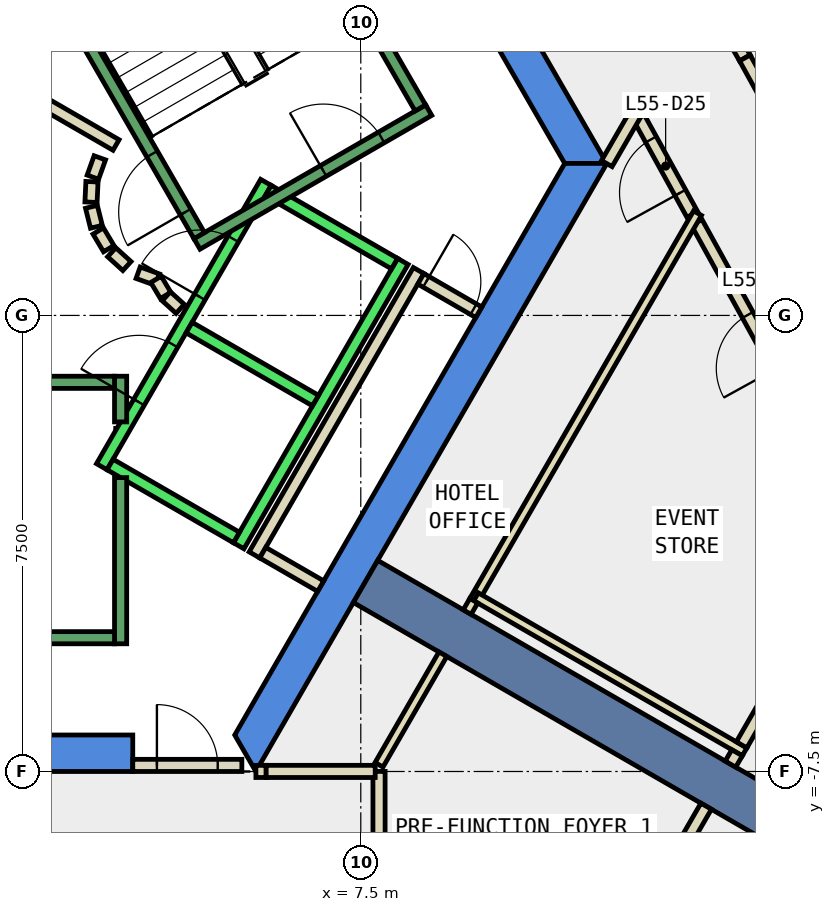
"""IFC4 building model, lengths in metres.
Left out: names, types, materials, properties, quantities, classifications, styles, units other than length and angle.
Written with IfcOpenShell. Run it as: python <this file> out.ifc"""

import sys

from ifc_helpers import new_model, si_unit, direction, frame, frame_2d, origin, place, context, subcontext, project, spatial, polyline, rectangle, outline, extrude, element, fill, save


model = new_model("IFC4")
c1 = context("Model", 3, precision=1e-05, world=origin(), true_north=direction((0.0, 1.0)))
c2 = subcontext(c1, "Body", "Model", "MODEL_VIEW")
j1 = project(units=[si_unit("LENGTHUNIT", "METRE"), si_unit("PLANEANGLEUNIT", "RADIAN")], contexts=[c1])
p1 = place(None, origin())
s1 = spatial("IfcSite", under=j1, at=p1, CompositionType="ELEMENT")
p2 = place(p1, origin())
s2 = spatial("IfcBuilding", under=s1, at=p2, CompositionType="ELEMENT")
p3 = place(p2, frame((0.0, 0.0, 245.0)))
s3 = spatial("IfcBuildingStorey", under=s2, at=p3, CompositionType="ELEMENT", Elevation=245.0)
p4 = place(p3, frame((0.0, 0.0, -0.34)))
e1 = element("IfcWall", 1, at=p4, inside=s3, PredefinedType="SHEAR", context=c2, shape_type="SweptSolid", body=[
    extrude(outline(polyline([(6.786, 10.747), (6.266, 10.447), (10.854, 2.5), (11.547, 2.5), (6.786, 10.747)])), origin(), (0.0, 0.0, 1.0), 3.6),
])
p5 = place(p3, frame((0.0, 0.0, -0.34)))
e2 = element("IfcWall", 2, at=p5, inside=s3, PredefinedType="SHEAR", context=c2, shape_type="SweptSolid", body=[
    extrude(outline(polyline([(3.75, -7.5), (3.75, -6.9), (-5.427, -6.9), (-5.774, -7.5), (3.75, -7.5)])), origin(), (0.0, 0.0, 1.0), 3.6),
])
p6 = place(p3, frame((0.0, 0.0, -0.34)))
e3 = element("IfcWall", 3, at=p6, inside=s3, PredefinedType="SHEAR", context=c2, shape_type="SweptSolid", body=[
    extrude(outline(polyline([(5.774, -7.5), (11.547, 2.5), (10.854, 2.5), (5.427, -6.9), (5.774, -7.5)])), origin(), (0.0, 0.0, 1.0), 3.6),
])
p7 = place(p3, frame((7.578, -4.375, -0.34), z_axis=(0.0, 0.0, 1.0), x_axis=(0.866024315419, -0.5000018851, 0.0)))
e4 = element("IfcWall", 4, at=p7, inside=s3, PredefinedType="SHEAR", context=c2, shape_type="SweptSolid", body=[
    extrude(rectangle(XDim=9.0, YDim=0.8, at=frame_2d((4.5, 0.0))), origin(), (0.0, 0.0, 1.0), 3.6),
])
p8 = place(p3, frame((12.952, 1.661, 0.0), z_axis=(0.0, 0.0, 1.0), x_axis=(-0.482707835392, 0.875781448566, 0.0)))
e5 = element("IfcWall", 5, at=p8, inside=s3, PredefinedType="PARTITIONING", context=c2, shape_type="SweptSolid", body=[
    extrude(rectangle(XDim=1.817, YDim=0.2, at=frame_2d((0.908, 0.0))), origin(), (0.0, 0.0, 1.0), 3.26),
])
p9 = place(p8, frame((0.408, 0.0, 0.0)))
e6 = element("IfcOpeningElement", 6, at=p9, cuts=e5, PredefinedType="OPENING", context=c2, shape_type="SweptSolid", body=[
    extrude(rectangle(XDim=1.0, YDim=2.1, at=frame_2d((0.5, 1.05))), frame((0.0, 0.11, 0.0), z_axis=(0.0, -1.0, 0.0), x_axis=(1.0, 0.0, 0.0)), (0.0, 0.0, 1.0), 0.22),
])
p10 = place(p3, frame((12.079, 3.419, 0.0), z_axis=(0.0, 0.0, 1.0), x_axis=(-0.500674759037, -0.865635480825, 0.0)))
e7 = element("IfcWall", 7, at=p10, inside=s3, PredefinedType="PARTITIONING", context=c2, shape_type="SweptSolid", body=[
    extrude(rectangle(XDim=1.065, YDim=0.2, at=frame_2d((0.532, 0.0))), origin(), (0.0, 0.0, 1.0), 3.26),
])
p11 = place(p3, frame((15.186, -2.391, 0.0), z_axis=(0.0, 0.0, 1.0), x_axis=(-0.482858240592, 0.875698532311, 0.0)))
e8 = element("IfcWall", 8, at=p11, inside=s3, PredefinedType="PARTITIONING", context=c2, shape_type="SweptSolid", body=[
    extrude(rectangle(XDim=4.478, YDim=0.2, at=frame_2d((2.239, 0.0))), origin(), (0.0, 0.0, 1.0), 3.26),
])
p12 = place(p11, frame((1.739, 0.0, 0.0)))
e9 = element("IfcOpeningElement", 9, at=p12, cuts=e8, PredefinedType="OPENING", context=c2, shape_type="SweptSolid", body=[
    extrude(rectangle(XDim=1.0, YDim=2.1, at=frame_2d((0.5, 1.05))), frame((0.0, 0.11, 0.0), z_axis=(0.0, -1.0, 0.0), x_axis=(1.0, 0.0, 0.0)), (0.0, 0.0, 1.0), 0.22),
])
p13 = place(p3, frame((12.234, 6.977, 0.0), z_axis=(0.0, 0.0, 1.0), x_axis=(0.499820325382, -0.866129114125, 0.0)))
e10 = element("IfcWall", 10, at=p13, inside=s3, PredefinedType="PARTITIONING", context=c2, shape_type="SweptSolid", body=[
    extrude(rectangle(XDim=3.167, YDim=0.2, at=frame_2d((1.583, 0.0))), origin(), (0.0, 0.0, 1.0), 3.26),
])
p14 = place(p13, frame((1.084, 0.0, 0.0)))
e11 = element("IfcOpeningElement", 11, at=p14, cuts=e10, PredefinedType="OPENING", context=c2, shape_type="SweptSolid", body=[
    extrude(rectangle(XDim=1.0, YDim=2.1, at=frame_2d((0.5, 1.05))), frame((0.0, 0.11, 0.0), z_axis=(0.0, -1.0, 0.0), x_axis=(1.0, 0.0, 0.0)), (0.0, 0.0, 1.0), 0.22),
])
p15 = place(p3, frame((13.817, 4.234, 0.0), z_axis=(0.0, 0.0, 1.0), x_axis=(0.482871474341, -0.875691235121, 0.0)))
e12 = element("IfcWall", 12, at=p15, inside=s3, PredefinedType="PARTITIONING", context=c2, shape_type="SweptSolid", body=[
    extrude(rectangle(XDim=3.167, YDim=0.2, at=frame_2d((1.583, 0.0))), origin(), (0.0, 0.0, 1.0), 3.26),
])
p16 = place(p3, frame((5.751, -3.938, 0.0), z_axis=(0.0, 0.0, 1.0), x_axis=(0.500034260056, 0.866005622828, 0.0)))
e13 = element("IfcWall", 13, at=p16, inside=s3, PredefinedType="PARTITIONING", context=c2, shape_type="SweptSolid", body=[
    extrude(rectangle(XDim=5.399, YDim=0.2, at=frame_2d((2.7, 0.0))), origin(), (0.0, 0.0, 1.0), 3.26),
])
p17 = place(p3, frame((8.488, 0.602, 0.0), z_axis=(0.0, 0.0, 1.0), x_axis=(0.866063652425, -0.499933745558, 0.0)))
e14 = element("IfcWall", 14, at=p17, inside=s3, PredefinedType="PARTITIONING", context=c2, shape_type="SweptSolid", body=[
    extrude(rectangle(XDim=1.1, YDim=0.2, at=frame_2d((0.55, 0.0))), origin(), (0.0, 0.0, 1.0), 3.26),
])
p18 = place(p17, frame((0.1, 0.0, 0.0)))
e15 = element("IfcOpeningElement", 15, at=p18, cuts=e14, PredefinedType="OPENING", context=c2, shape_type="SweptSolid", body=[
    extrude(rectangle(XDim=0.9, YDim=2.1, at=frame_2d((0.45, 1.05))), frame((0.0, 0.11, 0.0), z_axis=(0.0, -1.0, 0.0), x_axis=(1.0, 0.0, 0.0)), (0.0, 0.0, 1.0), 0.22),
])
p19 = place(p3, frame((6.841, -4.452, 0.0), z_axis=(0.0, 0.0, 1.0), x_axis=(-0.86621513555, 0.499671230855, 0.0)))
e16 = element("IfcWall", 16, at=p19, inside=s3, PredefinedType="PARTITIONING", context=c2, shape_type="SweptSolid", body=[
    extrude(rectangle(XDim=1.1, YDim=0.2, at=frame_2d((0.55, 0.0))), origin(), (0.0, 0.0, 1.0), 3.26),
])
p20 = place(p3, frame((5.775, -7.499, 0.0), z_axis=(0.0, 0.0, 1.0), x_axis=(1.0, 0.0, 0.0)))
e17 = element("IfcWall", 17, at=p20, inside=s3, PredefinedType="PARTITIONING", context=c2, shape_type="SweptSolid", body=[
    extrude(rectangle(XDim=0.169, YDim=0.2, at=frame_2d((0.084, 0.0))), origin(), (0.0, 0.0, 1.0), 2.4),
])
p21 = place(p3, frame((7.8, -7.39, 0.0), z_axis=(0.0, 0.0, 1.0), x_axis=(0.499977374825, 0.866038466041, 0.0)))
e18 = element("IfcWall", 18, at=p21, inside=s3, PredefinedType="PARTITIONING", context=c2, shape_type="SweptSolid", body=[
    extrude(rectangle(XDim=2.1, YDim=0.15, at=frame_2d((1.05, 0.0))), origin(), (0.0, 0.0, 1.0), 3.26),
])
p22 = place(p3, frame((9.358, -4.692, 0.0), z_axis=(0.0, 0.0, 1.0), x_axis=(0.500027777314, 0.866009365951, 0.0)))
e19 = element("IfcWall", 19, at=p22, inside=s3, PredefinedType="PARTITIONING", context=c2, shape_type="SweptSolid", body=[
    extrude(rectangle(XDim=7.36, YDim=0.15, at=frame_2d((3.68, 0.0))), origin(), (0.0, 0.0, 1.0), 3.26),
])
p23 = place(p3, frame((1.866, 3.732, 0.0), z_axis=(0.0, 0.0, 1.0), x_axis=(0.866043361281, -0.499968895414, 0.0)))
e20 = element("IfcWall", 20, at=p23, inside=s3, PredefinedType="PARTITIONING", context=c2, shape_type="SweptSolid", body=[
    extrude(rectangle(XDim=1.858, YDim=0.2, at=frame_2d((0.929, 0.0))), origin(), (0.0, 0.0, 1.0), 3.26),
])
p24 = place(p3, frame((3.208, 2.592, 0.0), z_axis=(0.0, 0.0, 1.0), x_axis=(-0.337388820924, -0.941365382578, 0.0)))
e21 = element("IfcWall", 21, at=p24, inside=s3, PredefinedType="PARTITIONING", context=c2, shape_type="SweptSolid", body=[
    extrude(rectangle(XDim=0.338, YDim=0.2, at=frame_2d((0.169, 0.0))), origin(), (0.0, 0.0, 1.0), 3.26),
])
p25 = place(p3, frame((3.079, 2.199, 0.0), z_axis=(0.0, 0.0, 1.0), x_axis=(-0.047771483479, -0.998858290933, 0.0)))
e22 = element("IfcWall", 22, at=p25, inside=s3, PredefinedType="PARTITIONING", context=c2, shape_type="SweptSolid", body=[
    extrude(rectangle(XDim=0.337, YDim=0.2, at=frame_2d((0.169, 0.0))), origin(), (0.0, 0.0, 1.0), 3.26),
])
p26 = place(p3, frame((3.07, 1.786, 0.0), z_axis=(0.0, 0.0, 1.0), x_axis=(0.242705583207, -0.970099994784, 0.0)))
e23 = element("IfcWall", 23, at=p26, inside=s3, PredefinedType="PARTITIONING", context=c2, shape_type="SweptSolid", body=[
    extrude(rectangle(XDim=0.338, YDim=0.2, at=frame_2d((0.169, 0.0))), origin(), (0.0, 0.0, 1.0), 3.26),
])
for number, where, z_axis, x_axis in (
    (24, (3.182, 1.388, 0.0), (0.0, 0.0, 1.0), (0.512, -0.859, 0.0)),
    (25, (3.404, 1.039, 0.0), (0.0, 0.0, 1.0), (0.74, -0.672, 0.0)),
):
    element("IfcWall", number, at=place(p3, frame(where, z_axis=z_axis, x_axis=x_axis)), inside=s3, PredefinedType="PARTITIONING", context=c2, shape_type="SweptSolid", body=[
        extrude(rectangle(XDim=0.338, YDim=0.2, at=frame_2d((0.169, 0.0))), origin(), (0.0, 0.0, 1.0), 3.26),
    ])
p27 = place(p3, frame((3.838, 0.702, 0.0), z_axis=(0.0, 0.0, 1.0), x_axis=(0.941035081519, -0.338308993895, 0.0)))
e26 = element("IfcWall", 26, at=p27, inside=s3, PredefinedType="PARTITIONING", context=c2, shape_type="SweptSolid", body=[
    extrude(rectangle(XDim=0.337, YDim=0.2, at=frame_2d((0.168, 0.0))), origin(), (0.0, 0.0, 1.0), 3.26),
])
p28 = place(p3, frame((4.132, 0.593, 0.0), z_axis=(0.0, 0.0, 1.0), x_axis=(0.513561617048, -0.858052717201, 0.0)))
e27 = element("IfcWall", 27, at=p28, inside=s3, PredefinedType="PARTITIONING", context=c2, shape_type="SweptSolid", body=[
    extrude(rectangle(XDim=0.308, YDim=0.2, at=frame_2d((0.154, 0.0))), origin(), (0.0, 0.0, 1.0), 3.26),
])
p29 = place(p3, frame((4.301, 0.315, 0.0), z_axis=(0.0, 0.0, 1.0), x_axis=(0.741798017506, -0.670623367639, 0.0)))
e28 = element("IfcWall", 28, at=p29, inside=s3, PredefinedType="PARTITIONING", context=c2, shape_type="SweptSolid", body=[
    extrude(rectangle(XDim=0.309, YDim=0.2, at=frame_2d((0.154, 0.0))), origin(), (0.0, 0.0, 1.0), 3.26),
])
p30 = place(p3, frame((7.8, -7.499, 0.0), z_axis=(0.0, 0.0, 1.0), x_axis=(0.0, -1.0, 0.0)))
e29 = element("IfcWall", 29, at=p30, inside=s3, PredefinedType="PARTITIONING", context=c2, shape_type="SweptSolid", body=[
    extrude(rectangle(XDim=4.604, YDim=0.2, at=frame_2d((2.302, 0.0))), origin(), (0.0, 0.0, 1.0), 3.26),
])
p31 = place(p30, frame((1.802, 0.0, 0.0)))
e30 = element("IfcOpeningElement", 30, at=p31, cuts=e29, PredefinedType="OPENING", context=c2, shape_type="SweptSolid", body=[
    extrude(rectangle(XDim=1.0, YDim=2.1, at=frame_2d((0.5, 1.05))), frame((0.0, 0.11, 0.0), z_axis=(0.0, -1.0, 0.0), x_axis=(1.0, 0.0, 0.0)), (0.0, 0.0, 1.0), 0.22),
])
p32 = place(p3, frame((9.395, -4.627, 0.0), z_axis=(0.0, 0.0, 1.0), x_axis=(0.866034131428, -0.499984882974, 0.0)))
e31 = element("IfcWall", 31, at=p32, inside=s3, PredefinedType="PARTITIONING", context=c2, shape_type="SweptSolid", body=[
    extrude(rectangle(XDim=5.1, YDim=0.15, at=frame_2d((2.55, 0.0))), origin(), (0.0, 0.0, 1.0), 3.26),
])
p33 = place(p3, frame((13.18, -8.071, 0.0), z_axis=(0.0, 0.0, 1.0), x_axis=(-0.499914724673, -0.86607463192, 0.0)))
e32 = element("IfcWall", 32, at=p33, inside=s3, PredefinedType="PARTITIONING", context=c2, shape_type="SweptSolid", body=[
    extrude(rectangle(XDim=4.507, YDim=0.2, at=frame_2d((2.253, 0.0))), origin(), (0.0, 0.0, 1.0), 3.26),
])
p34 = place(p3, frame((13.688, -7.192, 0.0), z_axis=(0.0, 0.0, 1.0), x_axis=(-0.499787711288, -0.866147934042, 0.0)))
e33 = element("IfcWall", 33, at=p34, inside=s3, PredefinedType="PARTITIONING", context=c2, shape_type="SweptSolid", body=[
    extrude(rectangle(XDim=0.216, YDim=0.2, at=frame_2d((0.108, 0.0))), origin(), (0.0, 0.0, 1.0), 3.26),
])
p35 = place(p3, frame((15.793, -3.546, 0.0), z_axis=(0.0, 0.0, 1.0), x_axis=(-0.500000064182, -0.866025366729, 0.0)))
e34 = element("IfcWall", 34, at=p35, inside=s3, PredefinedType="PARTITIONING", context=c2, shape_type="SweptSolid", body=[
    extrude(rectangle(XDim=4.06, YDim=0.2, at=frame_2d((2.03, 0.0))), origin(), (0.0, 0.0, 1.0), 3.26),
])
p36 = place(p3, frame((3.75, -7.4, 0.0), z_axis=(0.0, 0.0, 1.0), x_axis=(1.0, 0.0, 0.0)))
e35 = element("IfcWall", 35, at=p36, inside=s3, PredefinedType="PARTITIONING", context=c2, shape_type="SweptSolid", body=[
    extrude(rectangle(XDim=1.794, YDim=0.2, at=frame_2d((0.897, 0.0))), origin(), (0.0, 0.0, 1.0), 2.4),
])
p37 = place(p36, frame((0.397, 0.0, 0.0)))
e36 = element("IfcOpeningElement", 36, at=p37, cuts=e35, PredefinedType="OPENING", context=c2, shape_type="SweptSolid", body=[
    extrude(rectangle(XDim=1.0, YDim=2.1, at=frame_2d((0.5, 1.05))), frame((0.0, 0.11, 0.0), z_axis=(0.0, -1.0, 0.0), x_axis=(1.0, 0.0, 0.0)), (0.0, 0.0, 1.0), 0.22),
])
p38 = place(p3, frame((9.25, -4.879, 0.0), z_axis=(0.0, 0.0, 1.0), x_axis=(0.499787711288, 0.866147934042, 0.0)))
e37 = element("IfcWall", 37, at=p38, inside=s3, PredefinedType="PARTITIONING", context=c2, shape_type="SweptSolid", body=[
    extrude(rectangle(XDim=0.216, YDim=0.15, at=frame_2d((0.108, 0.0))), origin(), (0.0, 0.0, 1.0), 3.26),
])
p39 = place(p3, frame((5.944, -7.499, 0.0), z_axis=(0.0, 0.0, 1.0), x_axis=(1.0, 0.0, 0.0)))
e38 = element("IfcWall", 38, at=p39, inside=s3, PredefinedType="PARTITIONING", context=c2, shape_type="SweptSolid", body=[
    extrude(rectangle(XDim=1.793, YDim=0.2, at=frame_2d((0.896, 0.0))), origin(), (0.0, 0.0, 1.0), 3.26),
])
p40 = place(p3, frame((3.24, -2.488, 0.0), z_axis=(0.0, 0.0, 1.0), x_axis=(0.500034260056, 0.866005622828, 0.0)))
e39 = element("IfcWall", 39, at=p40, inside=s3, PredefinedType="STANDARD", context=c2, shape_type="SweptSolid", body=[
    extrude(rectangle(XDim=5.399, YDim=0.2, at=frame_2d((2.7, 0.0))), origin(), (0.0, 0.0, 1.0), 3.26),
])
p41 = place(p40, frame((3.225, 0.0, 0.0)))
e40 = element("IfcOpeningElement", 40, at=p41, cuts=e39, PredefinedType="OPENING", context=c2, shape_type="SweptSolid", body=[
    extrude(rectangle(XDim=1.1, YDim=2.1, at=frame_2d((0.55, 1.05))), frame((0.0, 0.11, 0.0), z_axis=(0.0, -1.0, 0.0), x_axis=(1.0, 0.0, 0.0)), (0.0, 0.0, 1.0), 0.22),
])
p42 = place(p40, frame((1.225, 0.0, 0.0)))
e41 = element("IfcOpeningElement", 41, at=p42, cuts=e39, PredefinedType="OPENING", context=c2, shape_type="SweptSolid", body=[
    extrude(rectangle(XDim=1.1, YDim=2.1, at=frame_2d((0.55, 1.05))), frame((0.0, 0.11, 0.0), z_axis=(0.0, -1.0, 0.0), x_axis=(1.0, 0.0, 0.0)), (0.0, 0.0, 1.0), 0.22),
])
p43 = place(p3, frame((5.492, -3.788, 0.0), z_axis=(0.0, 0.0, 1.0), x_axis=(0.500034260056, 0.866005622828, 0.0)))
e42 = element("IfcWall", 42, at=p43, inside=s3, PredefinedType="STANDARD", context=c2, shape_type="SweptSolid", body=[
    extrude(rectangle(XDim=5.399, YDim=0.2, at=frame_2d((2.7, 0.0))), origin(), (0.0, 0.0, 1.0), 3.26),
])
p44 = place(p3, frame((3.377, -2.452, 0.0), z_axis=(0.0, 0.0, 1.0), x_axis=(0.865955154139, -0.50012165622, 0.0)))
e43 = element("IfcWall", 43, at=p44, inside=s3, PredefinedType="STANDARD", context=c2, shape_type="SweptSolid", body=[
    extrude(rectangle(XDim=2.4, YDim=0.2, at=frame_2d((1.2, 0.0))), origin(), (0.0, 0.0, 1.0), 3.26),
])
for number, where, z_axis, x_axis in (
    (44, (4.677, -0.2, 0.0), (0.0, 0.0, 1.0), (0.866, -0.5, 0.0)),
    (45, (5.977, 2.052, 0.0), (0.0, 0.0, 1.0), (0.866, -0.5, 0.0)),
):
    element("IfcWall", number, at=place(p3, frame(where, z_axis=z_axis, x_axis=x_axis)), inside=s3, PredefinedType="STANDARD", context=c2, shape_type="SweptSolid", body=[
        extrude(rectangle(XDim=2.399, YDim=0.2, at=frame_2d((1.2, 0.0))), origin(), (0.0, 0.0, 1.0), 3.26),
    ])
p45 = place(p3, frame((3.55, -2.667, 0.0), z_axis=(0.0, 0.0, 1.0), x_axis=(0.0, -1.0, 0.0)))
e46 = element("IfcWall", 46, at=p45, inside=s3, PredefinedType="STANDARD", context=c2, shape_type="SweptSolid", body=[
    extrude(rectangle(XDim=2.733, YDim=0.2, at=frame_2d((1.366, 0.0))), origin(), (0.0, 0.0, 1.0), 3.26),
])
p46 = place(p3, frame((3.55, -1.0, 0.0), z_axis=(0.0, 0.0, 1.0), x_axis=(0.0, -1.0, 0.0)))
e47 = element("IfcWall", 47, at=p46, inside=s3, PredefinedType="STANDARD", context=c2, shape_type="SweptSolid", body=[
    extrude(rectangle(XDim=0.751, YDim=0.2, at=frame_2d((0.375, 0.0))), origin(), (0.0, 0.0, 1.0), 3.26),
])
p47 = place(p3, frame((-3.45, -1.1, 0.0), z_axis=(0.0, 0.0, 1.0), x_axis=(1.0, 0.0, 0.0)))
e48 = element("IfcWall", 48, at=p47, inside=s3, PredefinedType="STANDARD", context=c2, shape_type="SweptSolid", body=[
    extrude(rectangle(XDim=6.9, YDim=0.2, at=frame_2d((3.45, 0.0))), origin(), (0.0, 0.0, 1.0), 3.26),
])
p48 = place(p47, frame((0.45, 0.0, 0.0)))
e49 = element("IfcOpeningElement", 49, at=p48, cuts=e48, PredefinedType="OPENING", context=c2, shape_type="SweptSolid", body=[
    extrude(rectangle(XDim=1.1, YDim=2.2, at=frame_2d((0.55, 1.1))), frame((0.0, 0.11, 0.0), z_axis=(0.0, -1.0, 0.0), x_axis=(1.0, 0.0, 0.0)), (0.0, 0.0, 1.0), 0.22),
])
p49 = place(p3, frame((-3.45, -5.3, 0.0), z_axis=(0.0, 0.0, 1.0), x_axis=(1.0, 0.0, 0.0)))
e50 = element("IfcWall", 50, at=p49, inside=s3, PredefinedType="STANDARD", context=c2, shape_type="SweptSolid", body=[
    extrude(rectangle(XDim=6.9, YDim=0.2, at=frame_2d((3.45, 0.0))), origin(), (0.0, 0.0, 1.0), 3.26),
])
p50 = place(p3, frame((4.806, 1.176, 0.0), z_axis=(0.0, 0.0, 1.0), x_axis=(0.866059941101, 0.499940174841, 0.0)))
e51 = element("IfcWall", 51, at=p50, inside=s3, PredefinedType="STANDARD", context=c2, shape_type="SweptSolid", body=[
    extrude(rectangle(XDim=4.4, YDim=0.2, at=frame_2d((2.2, 0.0))), origin(), (0.0, 0.0, 1.0), 3.26),
])
p51 = place(p50, frame((2.4, 0.0, 0.0)))
e52 = element("IfcOpeningElement", 52, at=p51, cuts=e51, PredefinedType="OPENING", context=c2, shape_type="SweptSolid", body=[
    extrude(rectangle(XDim=1.1, YDim=2.2, at=frame_2d((0.55, 1.1))), frame((0.0, 0.11, 0.0), z_axis=(0.0, -1.0, 0.0), x_axis=(1.0, 0.0, 0.0)), (0.0, 0.0, 1.0), 0.22),
])
p52 = place(p3, frame((4.843, 1.312, 0.0), z_axis=(0.0, 0.0, 1.0), x_axis=(-0.499963383562, 0.866046543262, 0.0)))
e53 = element("IfcWall", 53, at=p52, inside=s3, PredefinedType="STANDARD", context=c2, shape_type="SweptSolid", body=[
    extrude(rectangle(XDim=6.9, YDim=0.2, at=frame_2d((3.45, 0.0))), origin(), (0.0, 0.0, 1.0), 3.26),
])
p53 = place(p52, frame((0.45, 0.0, 0.0)))
e54 = element("IfcOpeningElement", 54, at=p53, cuts=e53, PredefinedType="OPENING", context=c2, shape_type="SweptSolid", body=[
    extrude(rectangle(XDim=1.1, YDim=2.2, at=frame_2d((0.55, 1.1))), frame((0.0, 0.11, 0.0), z_axis=(0.0, -1.0, 0.0), x_axis=(1.0, 0.0, 0.0)), (0.0, 0.0, 1.0), 0.22),
])
p54 = place(p3, frame((8.48, 3.412, 0.0), z_axis=(0.0, 0.0, 1.0), x_axis=(-0.499978703459, 0.866037698999, 0.0)))
e55 = element("IfcWall", 55, at=p54, inside=s3, PredefinedType="STANDARD", context=c2, shape_type="SweptSolid", body=[
    extrude(rectangle(XDim=6.9, YDim=0.2, at=frame_2d((3.45, 0.0))), origin(), (0.0, 0.0, 1.0), 3.26),
])
p55 = place(p12, origin())
e56 = element("IfcDoor", 56, at=p55, inside=s3, OperationType="SINGLE_SWING_LEFT", PredefinedType="DOOR", context=c2, shape_type="SweptSolid", body=[
    extrude(rectangle(XDim=1.0, YDim=2.1, at=frame_2d((0.5, 1.05))), frame((0.0, 0.025, 0.0), z_axis=(0.0, -1.0, 0.0), x_axis=(1.0, 0.0, 0.0)), (0.0, 0.0, 1.0), 0.05),
])
fill(e9, e56)
p56 = place(p9, origin())
e57 = element("IfcDoor", 57, at=p56, inside=s3, OperationType="SINGLE_SWING_RIGHT", PredefinedType="DOOR", context=c2, shape_type="SweptSolid", body=[
    extrude(rectangle(XDim=1.0, YDim=2.1, at=frame_2d((0.5, 1.05))), frame((0.0, 0.025, 0.0), z_axis=(0.0, -1.0, 0.0), x_axis=(1.0, 0.0, 0.0)), (0.0, 0.0, 1.0), 0.05),
])
fill(e6, e57)
p57 = place(p18, origin())
e58 = element("IfcDoor", 58, at=p57, inside=s3, OperationType="SINGLE_SWING_RIGHT", PredefinedType="DOOR", context=c2, shape_type="SweptSolid", body=[
    extrude(rectangle(XDim=0.9, YDim=2.1, at=frame_2d((0.45, 1.05))), frame((0.0, 0.025, 0.0), z_axis=(0.0, -1.0, 0.0), x_axis=(1.0, 0.0, 0.0)), (0.0, 0.0, 1.0), 0.05),
])
fill(e15, e58)
p58 = place(p37, origin())
e59 = element("IfcDoor", 59, at=p58, inside=s3, OperationType="SINGLE_SWING_LEFT", PredefinedType="DOOR", context=c2, shape_type="SweptSolid", body=[
    extrude(rectangle(XDim=1.0, YDim=2.1, at=frame_2d((0.5, 1.05))), frame((0.0, 0.025, 0.0), z_axis=(0.0, -1.0, 0.0), x_axis=(1.0, 0.0, 0.0)), (0.0, 0.0, 1.0), 0.05),
])
fill(e36, e59)
p59 = place(p41, origin())
e60 = element("IfcDoor", 60, at=p59, inside=s3, OperationType="SLIDING_TO_LEFT", PredefinedType="DOOR", context=c2, shape_type="SweptSolid", body=[
    extrude(rectangle(XDim=1.1, YDim=2.1, at=frame_2d((0.55, 1.05))), frame((0.0, 0.025, 0.0), z_axis=(0.0, -1.0, 0.0), x_axis=(1.0, 0.0, 0.0)), (0.0, 0.0, 1.0), 0.05),
])
fill(e40, e60)
p60 = place(p42, origin())
e61 = element("IfcDoor", 61, at=p60, inside=s3, OperationType="SLIDING_TO_LEFT", PredefinedType="DOOR", context=c2, shape_type="SweptSolid", body=[
    extrude(rectangle(XDim=1.1, YDim=2.1, at=frame_2d((0.55, 1.05))), frame((0.0, 0.025, 0.0), z_axis=(0.0, -1.0, 0.0), x_axis=(1.0, 0.0, 0.0)), (0.0, 0.0, 1.0), 0.05),
])
fill(e41, e61)
p61 = place(p53, origin())
e62 = element("IfcDoor", 62, at=p61, inside=s3, OperationType="SINGLE_SWING_LEFT", PredefinedType="DOOR", context=c2, shape_type="SweptSolid", body=[
    extrude(rectangle(XDim=1.1, YDim=2.2, at=frame_2d((0.55, 1.1))), frame((0.0, 0.025, 0.0), z_axis=(0.0, -1.0, 0.0), x_axis=(1.0, 0.0, 0.0)), (0.0, 0.0, 1.0), 0.05),
])
fill(e54, e62)
p62 = place(p51, origin())
e63 = element("IfcDoor", 63, at=p62, inside=s3, OperationType="SINGLE_SWING_LEFT", PredefinedType="DOOR", context=c2, shape_type="SweptSolid", body=[
    extrude(rectangle(XDim=1.1, YDim=2.2, at=frame_2d((0.55, 1.1))), frame((0.0, 0.025, 0.0), z_axis=(0.0, -1.0, 0.0), x_axis=(1.0, 0.0, 0.0)), (0.0, 0.0, 1.0), 0.05),
])
fill(e52, e63)
save(model, sys.argv[1])
